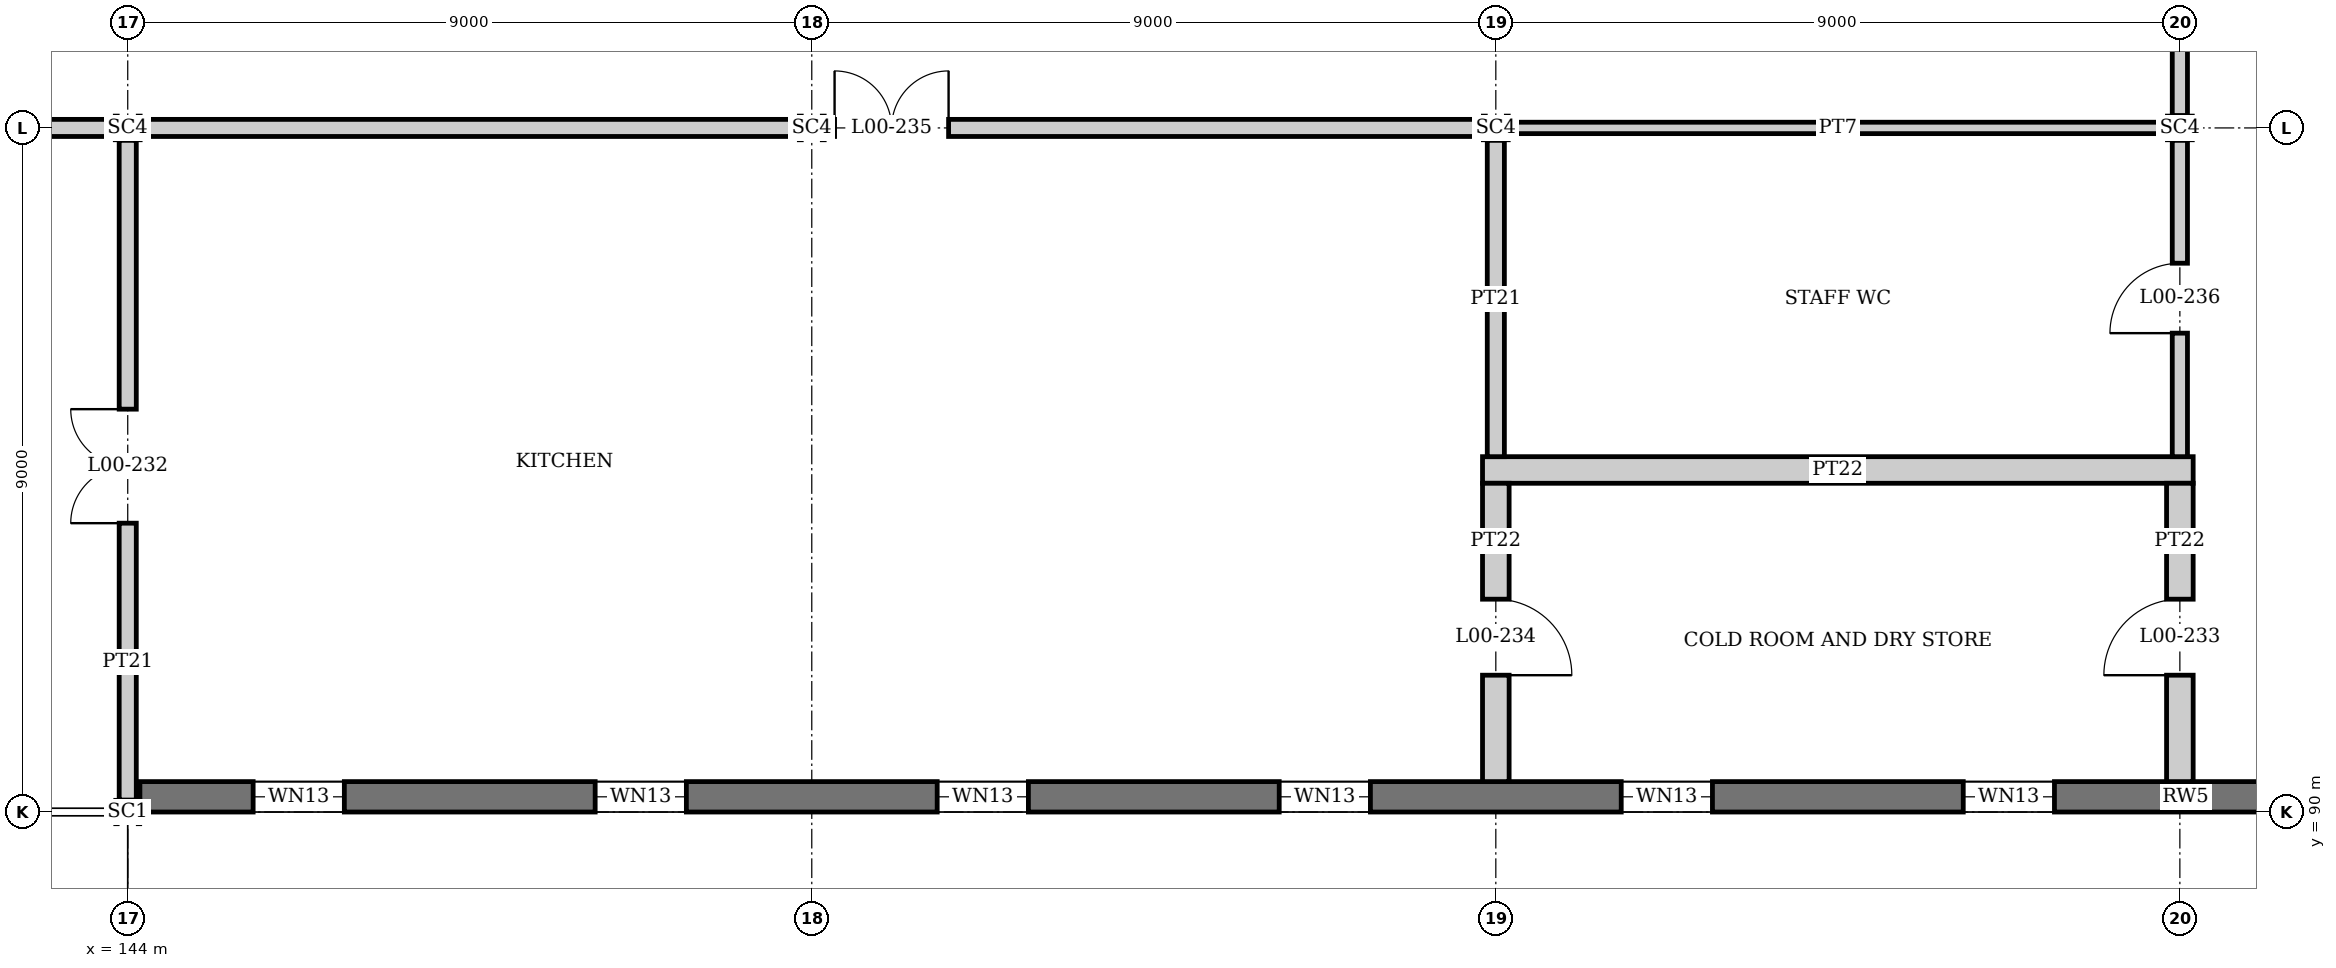
"""IFC4 building model, lengths in metres.
Left out: names, types, materials, properties, quantities, classifications, styles, units other than length and angle.
Written with IfcOpenShell. Run it as: python <this file> out.ifc"""

import sys

from ifc_helpers import new_model, si_unit, direction, frame, frame_2d, origin, origin_2d, place, context, subcontext, project, spatial, rectangle, i_section, extrude, element, fill, save


model = new_model("IFC4")
c1 = context("Model", 3, precision=1e-05, world=origin(), true_north=direction((0.0, 1.0)))
c2 = subcontext(c1, "Body", "Model", "MODEL_VIEW")
j1 = project(units=[si_unit("LENGTHUNIT", "METRE"), si_unit("PLANEANGLEUNIT", "RADIAN")], contexts=[c1])
p1 = place(None, origin())
s1 = spatial("IfcSite", under=j1, at=p1, CompositionType="ELEMENT")
p2 = place(p1, origin())
s2 = spatial("IfcBuilding", under=s1, at=p2, CompositionType="ELEMENT")
p3 = place(p2, origin())
s3 = spatial("IfcBuildingStorey", under=s2, at=p3, CompositionType="ELEMENT", Elevation=0.0)
p4 = place(p3, frame((144.0, 90.0, 0.0), z_axis=(0.0, 0.0, 1.0), x_axis=(0.0, 1.0, 0.0)))
e1 = element("IfcColumn", 1, at=p4, inside=s3, PredefinedType="COLUMN", context=c2, shape_type="SweptSolid", body=[
    extrude(i_section(OverallWidth=0.307, OverallDepth=0.315, WebThickness=0.012, FlangeThickness=0.019, at=origin_2d()), origin(), (0.0, 0.0, 1.0), 6.0),
])
for number, where, z_axis, x_axis in (
    (2, (144.0, 99.0, 0.0), (0.0, 0.0, 1.0), (0.0, 1.0, 0.0)),
    (3, (153.0, 99.0, 0.0), (0.0, 0.0, 1.0), (0.0, 1.0, 0.0)),
    (4, (162.0, 99.0, 0.0), (0.0, 0.0, 1.0), (0.0, 1.0, 0.0)),
    (5, (171.0, 99.0, 0.0), (0.0, 0.0, 1.0), (0.0, 1.0, 0.0)),
):
    element("IfcColumn", number, at=place(p3, frame(where, z_axis=z_axis, x_axis=x_axis)), inside=s3, PredefinedType="COLUMN", context=c2, shape_type="SweptSolid", body=[
        extrude(i_section(OverallWidth=0.311, OverallDepth=0.327, WebThickness=0.016, FlangeThickness=0.025, at=origin_2d()), origin(), (0.0, 0.0, 1.0), 6.0),
    ])
p5 = place(p3, frame((144.16, 90.2, 0.0), z_axis=(0.0, 0.0, 1.0), x_axis=(1.0, 0.0, 0.0)))
e6 = element("IfcWall", 6, at=p5, inside=s3, PredefinedType="SHEAR", context=c2, shape_type="SweptSolid", body=[
    extrude(rectangle(XDim=35.84, YDim=0.4, at=frame_2d((17.92, 0.0))), origin(), (0.0, 0.0, 1.0), 6.0),
])
p6 = place(p5, frame((1.49, 0.0, 1.2)))
e7 = element("IfcOpeningElement", 7, at=p6, cuts=e6, PredefinedType="OPENING", context=c2, shape_type="SweptSolid", body=[
    extrude(rectangle(XDim=1.2, YDim=1.2, at=frame_2d((0.6, 0.6))), frame((0.0, 0.21, 0.0), z_axis=(0.0, -1.0, 0.0), x_axis=(1.0, 0.0, 0.0)), (0.0, 0.0, 1.0), 0.42),
])
p7 = place(p5, frame((5.99, 0.0, 1.2)))
e8 = element("IfcOpeningElement", 8, at=p7, cuts=e6, PredefinedType="OPENING", context=c2, shape_type="SweptSolid", body=[
    extrude(rectangle(XDim=1.2, YDim=1.2, at=frame_2d((0.6, 0.6))), frame((0.0, 0.21, 0.0), z_axis=(0.0, -1.0, 0.0), x_axis=(1.0, 0.0, 0.0)), (0.0, 0.0, 1.0), 0.42),
])
p8 = place(p5, frame((10.49, 0.0, 1.2)))
e9 = element("IfcOpeningElement", 9, at=p8, cuts=e6, PredefinedType="OPENING", context=c2, shape_type="SweptSolid", body=[
    extrude(rectangle(XDim=1.2, YDim=1.2, at=frame_2d((0.6, 0.6))), frame((0.0, 0.21, 0.0), z_axis=(0.0, -1.0, 0.0), x_axis=(1.0, 0.0, 0.0)), (0.0, 0.0, 1.0), 0.42),
])
p9 = place(p5, frame((14.99, 0.0, 1.2)))
e10 = element("IfcOpeningElement", 10, at=p9, cuts=e6, PredefinedType="OPENING", context=c2, shape_type="SweptSolid", body=[
    extrude(rectangle(XDim=1.2, YDim=1.2, at=frame_2d((0.6, 0.6))), frame((0.0, 0.21, 0.0), z_axis=(0.0, -1.0, 0.0), x_axis=(1.0, 0.0, 0.0)), (0.0, 0.0, 1.0), 0.42),
])
p10 = place(p5, frame((19.49, 0.0, 1.2)))
e11 = element("IfcOpeningElement", 11, at=p10, cuts=e6, PredefinedType="OPENING", context=c2, shape_type="SweptSolid", body=[
    extrude(rectangle(XDim=1.2, YDim=1.2, at=frame_2d((0.6, 0.6))), frame((0.0, 0.21, 0.0), z_axis=(0.0, -1.0, 0.0), x_axis=(1.0, 0.0, 0.0)), (0.0, 0.0, 1.0), 0.42),
])
p11 = place(p5, frame((23.99, 0.0, 1.2)))
e12 = element("IfcOpeningElement", 12, at=p11, cuts=e6, PredefinedType="OPENING", context=c2, shape_type="SweptSolid", body=[
    extrude(rectangle(XDim=1.2, YDim=1.2, at=frame_2d((0.6, 0.6))), frame((0.0, 0.21, 0.0), z_axis=(0.0, -1.0, 0.0), x_axis=(1.0, 0.0, 0.0)), (0.0, 0.0, 1.0), 0.42),
])
p12 = place(p5, frame((28.64, 0.0, 0.6)))
e13 = element("IfcOpeningElement", 13, at=p12, cuts=e6, PredefinedType="OPENING", context=c2, shape_type="SweptSolid", body=[
    extrude(rectangle(XDim=0.9, YDim=2.7, at=frame_2d((0.45, 1.35))), frame((0.0, 0.21, 0.0), z_axis=(0.0, -1.0, 0.0), x_axis=(1.0, 0.0, 0.0)), (0.0, 0.0, 1.0), 0.42),
])
p13 = place(p5, frame((32.69, 0.0, 0.9)))
e14 = element("IfcOpeningElement", 14, at=p13, cuts=e6, PredefinedType="OPENING", context=c2, shape_type="SweptSolid", body=[
    extrude(rectangle(XDim=1.8, YDim=1.5, at=frame_2d((0.9, 0.75))), frame((0.0, 0.21, 0.0), z_axis=(0.0, -1.0, 0.0), x_axis=(1.0, 0.0, 0.0)), (0.0, 0.0, 1.0), 0.42),
])
p14 = place(p3, frame((161.825, 94.5, 0.0), z_axis=(0.0, 0.0, 1.0), x_axis=(1.0, 0.0, 0.0)))
e15 = element("IfcWall", 15, at=p14, inside=s3, PredefinedType="PARTITIONING", context=c2, shape_type="SweptSolid", body=[
    extrude(rectangle(XDim=9.35, YDim=0.35, at=frame_2d((4.675, 0.0))), origin(), (0.0, 0.0, 1.0), 5.447),
])
p15 = place(p3, frame((135.164, 99.0, 0.0), z_axis=(0.0, 0.0, 1.0), x_axis=(1.0, 0.0, 0.0)))
e16 = element("IfcWall", 16, at=p15, inside=s3, PredefinedType="PARTITIONING", context=c2, shape_type="SweptSolid", body=[
    extrude(rectangle(XDim=8.673, YDim=0.225, at=frame_2d((4.336, 0.0))), origin(), (0.0, 0.0, 1.0), 5.322),
])
p16 = place(p15, frame((0.136, 0.0, 0.0)))
e17 = element("IfcOpeningElement", 17, at=p16, cuts=e16, PredefinedType="OPENING", context=c2, shape_type="SweptSolid", body=[
    extrude(rectangle(XDim=1.8, YDim=2.1, at=frame_2d((0.9, 1.05))), frame((0.0, 0.123, 0.0), z_axis=(0.0, -1.0, 0.0), x_axis=(1.0, 0.0, 0.0)), (0.0, 0.0, 1.0), 0.245),
])
p17 = place(p3, frame((144.164, 99.0, 0.0), z_axis=(0.0, 0.0, 1.0), x_axis=(1.0, 0.0, 0.0)))
e18 = element("IfcWall", 18, at=p17, inside=s3, PredefinedType="PARTITIONING", context=c2, shape_type="SweptSolid", body=[
    extrude(rectangle(XDim=8.673, YDim=0.225, at=frame_2d((4.336, 0.0))), origin(), (0.0, 0.0, 1.0), 5.322),
])
p18 = place(p3, frame((153.164, 99.0, 0.0), z_axis=(0.0, 0.0, 1.0), x_axis=(1.0, 0.0, 0.0)))
e19 = element("IfcWall", 19, at=p18, inside=s3, PredefinedType="PARTITIONING", context=c2, shape_type="SweptSolid", body=[
    extrude(rectangle(XDim=8.673, YDim=0.225, at=frame_2d((4.336, 0.0))), origin(), (0.0, 0.0, 1.0), 5.322),
])
p19 = place(p18, frame((0.136, 0.0, 0.0)))
e20 = element("IfcOpeningElement", 20, at=p19, cuts=e19, PredefinedType="OPENING", context=c2, shape_type="SweptSolid", body=[
    extrude(rectangle(XDim=1.5, YDim=2.1, at=frame_2d((0.75, 1.05))), frame((0.0, 0.123, 0.0), z_axis=(0.0, -1.0, 0.0), x_axis=(1.0, 0.0, 0.0)), (0.0, 0.0, 1.0), 0.245),
])
p20 = place(p3, frame((162.164, 99.0, 0.0), z_axis=(0.0, 0.0, 1.0), x_axis=(1.0, 0.0, 0.0)))
e21 = element("IfcWall", 21, at=p20, inside=s3, PredefinedType="PARTITIONING", context=c2, shape_type="SweptSolid", body=[
    extrude(rectangle(XDim=8.673, YDim=0.15, at=frame_2d((4.336, 0.0))), origin(), (0.0, 0.0, 1.0), 5.322),
])
p21 = place(p3, frame((144.0, 90.157, 0.0), z_axis=(0.0, 0.0, 1.0), x_axis=(0.0, 1.0, 0.0)))
e22 = element("IfcWall", 22, at=p21, inside=s3, PredefinedType="PARTITIONING", context=c2, shape_type="SweptSolid", body=[
    extrude(rectangle(XDim=8.679, YDim=0.225, at=frame_2d((4.339, 0.0))), origin(), (0.0, 0.0, 1.0), 5.447),
])
p22 = place(p21, frame((3.643, 0.0, 0.0)))
e23 = element("IfcOpeningElement", 23, at=p22, cuts=e22, PredefinedType="OPENING", context=c2, shape_type="SweptSolid", body=[
    extrude(rectangle(XDim=1.5, YDim=2.1, at=frame_2d((0.75, 1.05))), frame((0.0, 0.123, 0.0), z_axis=(0.0, -1.0, 0.0), x_axis=(1.0, 0.0, 0.0)), (0.0, 0.0, 1.0), 0.245),
])
p23 = place(p3, frame((162.0, 90.4, 0.0), z_axis=(0.0, 0.0, 1.0), x_axis=(0.0, 1.0, 0.0)))
e24 = element("IfcWall", 24, at=p23, inside=s3, PredefinedType="PARTITIONING", context=c2, shape_type="SweptSolid", body=[
    extrude(rectangle(XDim=3.925, YDim=0.35, at=frame_2d((1.962, 0.0))), origin(), (0.0, 0.0, 1.0), 5.447),
])
p24 = place(p23, frame((1.4, 0.0, 0.0)))
e25 = element("IfcOpeningElement", 25, at=p24, cuts=e24, PredefinedType="OPENING", context=c2, shape_type="SweptSolid", body=[
    extrude(rectangle(XDim=1.0, YDim=2.1, at=frame_2d((0.5, 1.05))), frame((0.0, 0.185, 0.0), z_axis=(0.0, -1.0, 0.0), x_axis=(1.0, 0.0, 0.0)), (0.0, 0.0, 1.0), 0.37),
])
p25 = place(p3, frame((162.0, 94.675, 0.0), z_axis=(0.0, 0.0, 1.0), x_axis=(0.0, 1.0, 0.0)))
e26 = element("IfcWall", 26, at=p25, inside=s3, PredefinedType="PARTITIONING", context=c2, shape_type="SweptSolid", body=[
    extrude(rectangle(XDim=4.161, YDim=0.225, at=frame_2d((2.081, 0.0))), origin(), (0.0, 0.0, 1.0), 5.447),
])
p26 = place(p3, frame((171.0, 90.4, 0.0), z_axis=(0.0, 0.0, 1.0), x_axis=(0.0, 1.0, 0.0)))
e27 = element("IfcWall", 27, at=p26, inside=s3, PredefinedType="PARTITIONING", context=c2, shape_type="SweptSolid", body=[
    extrude(rectangle(XDim=3.925, YDim=0.35, at=frame_2d((1.962, 0.0))), origin(), (0.0, 0.0, 1.0), 5.447),
])
p27 = place(p26, frame((1.4, 0.0, 0.0)))
e28 = element("IfcOpeningElement", 28, at=p27, cuts=e27, PredefinedType="OPENING", context=c2, shape_type="SweptSolid", body=[
    extrude(rectangle(XDim=1.0, YDim=2.1, at=frame_2d((0.5, 1.05))), frame((0.0, 0.185, 0.0), z_axis=(0.0, -1.0, 0.0), x_axis=(1.0, 0.0, 0.0)), (0.0, 0.0, 1.0), 0.37),
])
p28 = place(p3, frame((171.0, 94.675, 0.0), z_axis=(0.0, 0.0, 1.0), x_axis=(0.0, 1.0, 0.0)))
e29 = element("IfcWall", 29, at=p28, inside=s3, PredefinedType="PARTITIONING", context=c2, shape_type="SweptSolid", body=[
    extrude(rectangle(XDim=4.161, YDim=0.2, at=frame_2d((2.081, 0.0))), origin(), (0.0, 0.0, 1.0), 5.447),
])
p29 = place(p28, frame((1.625, 0.0, 0.0)))
e30 = element("IfcOpeningElement", 30, at=p29, cuts=e29, PredefinedType="OPENING", context=c2, shape_type="SweptSolid", body=[
    extrude(rectangle(XDim=0.92, YDim=2.1, at=frame_2d((0.46, 1.05))), frame((0.0, 0.11, 0.0), z_axis=(0.0, -1.0, 0.0), x_axis=(1.0, 0.0, 0.0)), (0.0, 0.0, 1.0), 0.22),
])
p30 = place(p3, frame((171.0, 99.164, 0.0), z_axis=(0.0, 0.0, 1.0), x_axis=(0.0, 1.0, 0.0)))
e31 = element("IfcWall", 31, at=p30, inside=s3, PredefinedType="PARTITIONING", context=c2, shape_type="SweptSolid", body=[
    extrude(rectangle(XDim=8.836, YDim=0.2, at=frame_2d((4.418, 0.0))), origin(), (0.0, 0.0, 1.0), 5.322),
])
p31 = place(p30, frame((3.886, 0.0, 0.0)))
e32 = element("IfcOpeningElement", 32, at=p31, cuts=e31, PredefinedType="OPENING", context=c2, shape_type="SweptSolid", body=[
    extrude(rectangle(XDim=1.0, YDim=2.1, at=frame_2d((0.5, 1.05))), frame((0.0, 0.11, 0.0), z_axis=(0.0, -1.0, 0.0), x_axis=(1.0, 0.0, 0.0)), (0.0, 0.0, 1.0), 0.22),
])
p32 = place(p6, origin())
e33 = element("IfcWindow", 33, at=p32, inside=s3, PartitioningType="SINGLE_PANEL", PredefinedType="WINDOW", context=c2, shape_type="SweptSolid", body=[
    extrude(rectangle(XDim=1.2, YDim=1.2, at=frame_2d((0.6, 0.6))), frame((0.0, 0.03, 0.0), z_axis=(0.0, -1.0, 0.0), x_axis=(1.0, 0.0, 0.0)), (0.0, 0.0, 1.0), 0.06),
])
fill(e7, e33)
p33 = place(p7, origin())
e34 = element("IfcWindow", 34, at=p33, inside=s3, PartitioningType="SINGLE_PANEL", PredefinedType="WINDOW", context=c2, shape_type="SweptSolid", body=[
    extrude(rectangle(XDim=1.2, YDim=1.2, at=frame_2d((0.6, 0.6))), frame((0.0, 0.03, 0.0), z_axis=(0.0, -1.0, 0.0), x_axis=(1.0, 0.0, 0.0)), (0.0, 0.0, 1.0), 0.06),
])
fill(e8, e34)
p34 = place(p8, origin())
e35 = element("IfcWindow", 35, at=p34, inside=s3, PartitioningType="SINGLE_PANEL", PredefinedType="WINDOW", context=c2, shape_type="SweptSolid", body=[
    extrude(rectangle(XDim=1.2, YDim=1.2, at=frame_2d((0.6, 0.6))), frame((0.0, 0.03, 0.0), z_axis=(0.0, -1.0, 0.0), x_axis=(1.0, 0.0, 0.0)), (0.0, 0.0, 1.0), 0.06),
])
fill(e9, e35)
p35 = place(p9, origin())
e36 = element("IfcWindow", 36, at=p35, inside=s3, PartitioningType="SINGLE_PANEL", PredefinedType="WINDOW", context=c2, shape_type="SweptSolid", body=[
    extrude(rectangle(XDim=1.2, YDim=1.2, at=frame_2d((0.6, 0.6))), frame((0.0, 0.03, 0.0), z_axis=(0.0, -1.0, 0.0), x_axis=(1.0, 0.0, 0.0)), (0.0, 0.0, 1.0), 0.06),
])
fill(e10, e36)
p36 = place(p10, origin())
e37 = element("IfcWindow", 37, at=p36, inside=s3, PartitioningType="SINGLE_PANEL", PredefinedType="WINDOW", context=c2, shape_type="SweptSolid", body=[
    extrude(rectangle(XDim=1.2, YDim=1.2, at=frame_2d((0.6, 0.6))), frame((0.0, 0.03, 0.0), z_axis=(0.0, -1.0, 0.0), x_axis=(1.0, 0.0, 0.0)), (0.0, 0.0, 1.0), 0.06),
])
fill(e11, e37)
p37 = place(p11, origin())
e38 = element("IfcWindow", 38, at=p37, inside=s3, PartitioningType="SINGLE_PANEL", PredefinedType="WINDOW", context=c2, shape_type="SweptSolid", body=[
    extrude(rectangle(XDim=1.2, YDim=1.2, at=frame_2d((0.6, 0.6))), frame((0.0, 0.03, 0.0), z_axis=(0.0, -1.0, 0.0), x_axis=(1.0, 0.0, 0.0)), (0.0, 0.0, 1.0), 0.06),
])
fill(e12, e38)
p38 = place(p22, origin())
e39 = element("IfcDoor", 39, at=p38, inside=s3, OperationType="DOUBLE_DOOR_SINGLE_SWING", PredefinedType="DOOR", context=c2, shape_type="SweptSolid", body=[
    extrude(rectangle(XDim=1.5, YDim=2.1, at=frame_2d((0.75, 1.05))), frame((0.0, 0.025, 0.0), z_axis=(0.0, -1.0, 0.0), x_axis=(1.0, 0.0, 0.0)), (0.0, 0.0, 1.0), 0.05),
])
fill(e23, e39)
p39 = place(p27, origin())
e40 = element("IfcDoor", 40, at=p39, inside=s3, OperationType="SINGLE_SWING_LEFT", PredefinedType="DOOR", context=c2, shape_type="SweptSolid", body=[
    extrude(rectangle(XDim=1.0, YDim=2.1, at=frame_2d((0.5, 1.05))), frame((0.0, 0.025, 0.0), z_axis=(0.0, -1.0, 0.0), x_axis=(1.0, 0.0, 0.0)), (0.0, 0.0, 1.0), 0.05),
])
fill(e28, e40)
p40 = place(p24, frame((1.0, 0.0, 0.0), z_axis=(0.0, 0.0, 1.0), x_axis=(-1.0, 0.0, 0.0)))
e41 = element("IfcDoor", 41, at=p40, inside=s3, OperationType="SINGLE_SWING_RIGHT", PredefinedType="DOOR", context=c2, shape_type="SweptSolid", body=[
    extrude(rectangle(XDim=1.0, YDim=2.1, at=frame_2d((0.5, 1.05))), frame((0.0, 0.025, 0.0), z_axis=(0.0, -1.0, 0.0), x_axis=(1.0, 0.0, 0.0)), (0.0, 0.0, 1.0), 0.05),
])
fill(e25, e41)
p41 = place(p19, origin())
e42 = element("IfcDoor", 42, at=p41, inside=s3, OperationType="DOUBLE_DOOR_SINGLE_SWING", PredefinedType="DOOR", context=c2, shape_type="SweptSolid", body=[
    extrude(rectangle(XDim=1.5, YDim=2.1, at=frame_2d((0.75, 1.05))), frame((0.0, 0.025, 0.0), z_axis=(0.0, -1.0, 0.0), x_axis=(1.0, 0.0, 0.0)), (0.0, 0.0, 1.0), 0.05),
])
fill(e20, e42)
p42 = place(p29, origin())
e43 = element("IfcDoor", 43, at=p42, inside=s3, OperationType="SINGLE_SWING_LEFT", PredefinedType="DOOR", context=c2, shape_type="SweptSolid", body=[
    extrude(rectangle(XDim=0.92, YDim=2.1, at=frame_2d((0.46, 1.05))), frame((0.0, 0.025, 0.0), z_axis=(0.0, -1.0, 0.0), x_axis=(1.0, 0.0, 0.0)), (0.0, 0.0, 1.0), 0.05),
])
fill(e30, e43)
save(model, sys.argv[1])
